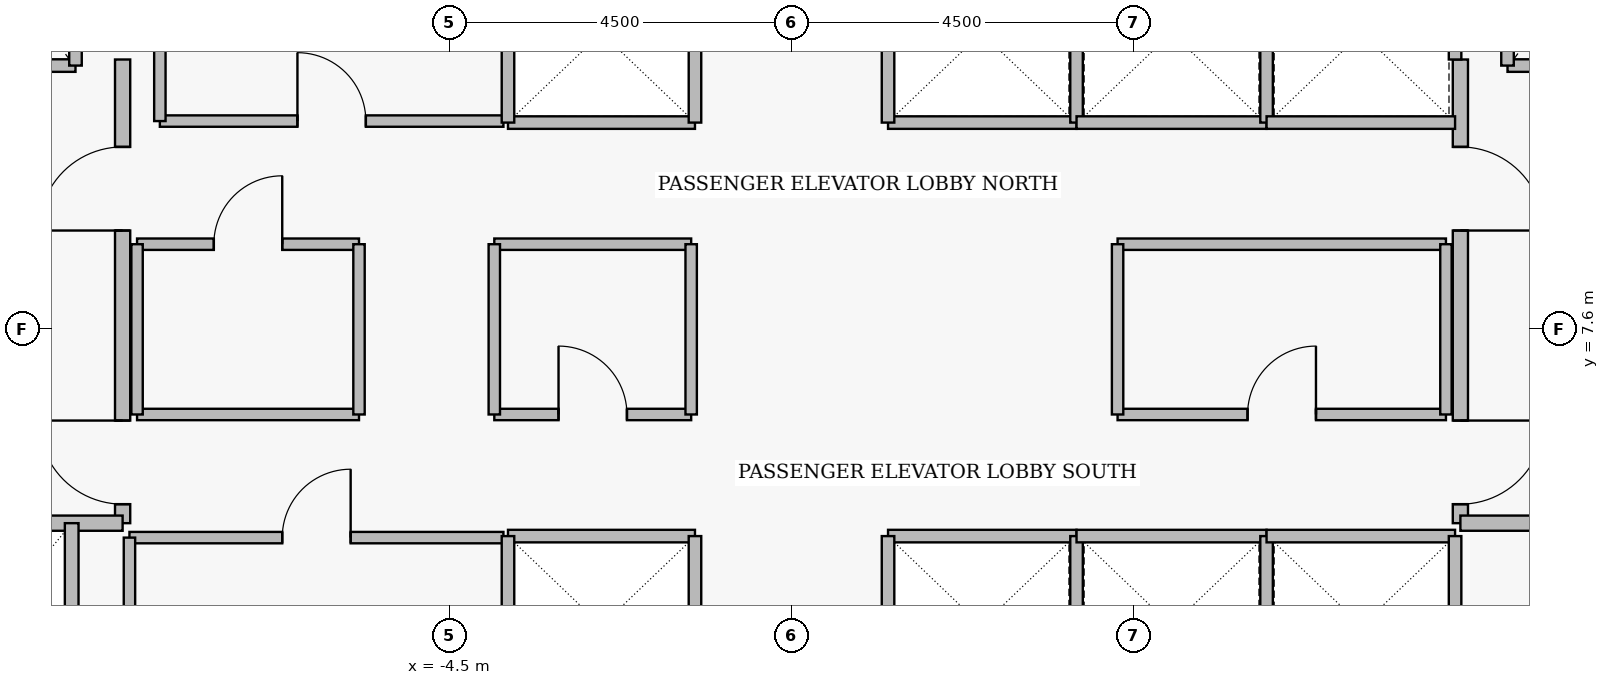
"""IFC4 building model, lengths in metres.
Left out: names, types, materials, properties, quantities, classifications, styles, units other than length and angle.
Written with IfcOpenShell. Run it as: python <this file> out.ifc"""

import sys

from ifc_helpers import new_model, si_unit, direction, frame, frame_2d, origin, place, context, subcontext, project, spatial, rectangle, extrude, element, fill, save


model = new_model("IFC4")
c1 = context("Model", 3, precision=1e-05, world=origin(), true_north=direction((0.0, 1.0)))
c2 = subcontext(c1, "Body", "Model", "MODEL_VIEW")
j1 = project(units=[si_unit("LENGTHUNIT", "METRE"), si_unit("PLANEANGLEUNIT", "RADIAN")], contexts=[c1])
p1 = place(None, origin())
s1 = spatial("IfcSite", under=j1, at=p1, CompositionType="ELEMENT")
p2 = place(p1, origin())
s2 = spatial("IfcBuilding", under=s1, at=p2, CompositionType="ELEMENT")
p3 = place(p2, frame((0.0, 0.0, 162.2)))
s3 = spatial("IfcBuildingStorey", under=s2, at=p3, CompositionType="ELEMENT", Elevation=162.2)
p4 = place(p3, frame((-8.8, 5.05, 0.0), z_axis=(0.0, 0.0, 1.0), x_axis=(0.0, 1.0, 0.0)))
e1 = element("IfcWall", 1, at=p4, inside=s3, PredefinedType="PARTITIONING", context=c2, shape_type="SweptSolid", body=[
    extrude(rectangle(XDim=6.1, YDim=0.2, at=frame_2d((3.05, 0.0))), origin(), (0.0, 0.0, 1.0), 5.74),
])
p5 = place(p4, frame((0.25, 0.0, 0.0)))
e2 = element("IfcOpeningElement", 2, at=p5, cuts=e1, PredefinedType="OPENING", context=c2, shape_type="SweptSolid", body=[
    extrude(rectangle(XDim=1.1, YDim=2.2, at=frame_2d((0.55, 1.1))), frame((0.0, 0.11, 0.0), z_axis=(0.0, -1.0, 0.0), x_axis=(1.0, 0.0, 0.0)), (0.0, 0.0, 1.0), 0.22),
])
p6 = place(p4, frame((3.85, 0.0, 0.0)))
e3 = element("IfcOpeningElement", 3, at=p6, cuts=e1, PredefinedType="OPENING", context=c2, shape_type="SweptSolid", body=[
    extrude(rectangle(XDim=1.1, YDim=2.2, at=frame_2d((0.55, 1.1))), frame((0.0, 0.11, 0.0), z_axis=(0.0, -1.0, 0.0), x_axis=(1.0, 0.0, 0.0)), (0.0, 0.0, 1.0), 0.22),
])
p7 = place(p3, frame((8.8, 11.15, 0.0), z_axis=(0.0, 0.0, 1.0), x_axis=(0.0, -1.0, 0.0)))
e4 = element("IfcWall", 4, at=p7, inside=s3, PredefinedType="PARTITIONING", context=c2, shape_type="SweptSolid", body=[
    extrude(rectangle(XDim=6.1, YDim=0.2, at=frame_2d((3.05, 0.0))), origin(), (0.0, 0.0, 1.0), 5.74),
])
p8 = place(p7, frame((1.15, 0.0, 0.0)))
e5 = element("IfcOpeningElement", 5, at=p8, cuts=e4, PredefinedType="OPENING", context=c2, shape_type="SweptSolid", body=[
    extrude(rectangle(XDim=1.1, YDim=2.2, at=frame_2d((0.55, 1.1))), frame((0.0, 0.11, 0.0), z_axis=(0.0, -1.0, 0.0), x_axis=(1.0, 0.0, 0.0)), (0.0, 0.0, 1.0), 0.22),
])
p9 = place(p7, frame((4.75, 0.0, 0.0)))
e6 = element("IfcOpeningElement", 6, at=p9, cuts=e4, PredefinedType="OPENING", context=c2, shape_type="SweptSolid", body=[
    extrude(rectangle(XDim=1.1, YDim=2.2, at=frame_2d((0.55, 1.1))), frame((0.0, 0.11, 0.0), z_axis=(0.0, -1.0, 0.0), x_axis=(1.0, 0.0, 0.0)), (0.0, 0.0, 1.0), 0.22),
])
p10 = place(p3, frame((-11.58, 11.07, 0.0), z_axis=(0.0, 0.0, 1.0), x_axis=(1.0, 0.0, 0.0)))
e7 = element("IfcWall", 7, at=p10, inside=s3, PredefinedType="PARTITIONING", context=c2, shape_type="SweptSolid", body=[
    extrude(rectangle(XDim=2.16, YDim=0.165, at=frame_2d((1.08, 0.0))), origin(), (0.0, 0.0, 1.0), 5.74),
])
p11 = place(p10, frame((0.53, 0.0, 0.0)))
e8 = element("IfcOpeningElement", 8, at=p11, cuts=e7, PredefinedType="OPENING", context=c2, shape_type="SweptSolid", body=[
    extrude(rectangle(XDim=1.15, YDim=2.25, at=frame_2d((0.575, 1.125))), frame((0.0, 0.093, 0.0), z_axis=(0.0, -1.0, 0.0), x_axis=(1.0, 0.0, 0.0)), (0.0, 0.0, 1.0), 0.185),
])
p12 = place(p3, frame((9.42, 11.07, 0.0), z_axis=(0.0, 0.0, 1.0), x_axis=(1.0, 0.0, 0.0)))
e9 = element("IfcWall", 9, at=p12, inside=s3, PredefinedType="PARTITIONING", context=c2, shape_type="SweptSolid", body=[
    extrude(rectangle(XDim=2.16, YDim=0.165, at=frame_2d((1.08, 0.0))), origin(), (0.0, 0.0, 1.0), 5.74),
])
p13 = place(p12, frame((0.53, 0.0, 0.0)))
e10 = element("IfcOpeningElement", 10, at=p13, cuts=e9, PredefinedType="OPENING", context=c2, shape_type="SweptSolid", body=[
    extrude(rectangle(XDim=1.15, YDim=2.25, at=frame_2d((0.575, 1.125))), frame((0.0, 0.093, 0.0), z_axis=(0.0, -1.0, 0.0), x_axis=(1.0, 0.0, 0.0)), (0.0, 0.0, 1.0), 0.185),
])
p14 = place(p3, frame((-8.71, 4.86, 0.0), z_axis=(0.0, 0.0, 1.0), x_axis=(1.0, 0.0, 0.0)))
e11 = element("IfcWall", 11, at=p14, inside=s3, PredefinedType="PARTITIONING", context=c2, shape_type="SweptSolid", body=[
    extrude(rectangle(XDim=4.92, YDim=0.15, at=frame_2d((2.46, 0.0))), origin(), (0.0, 0.0, 1.0), 5.74),
])
p15 = place(p14, frame((2.01, 0.0, 0.0)))
e12 = element("IfcOpeningElement", 12, at=p15, cuts=e11, PredefinedType="OPENING", context=c2, shape_type="SweptSolid", body=[
    extrude(rectangle(XDim=0.9, YDim=2.15, at=frame_2d((0.45, 1.075))), frame((0.0, 0.085, 0.0), z_axis=(0.0, -1.0, 0.0), x_axis=(1.0, 0.0, 0.0)), (0.0, 0.0, 1.0), 0.17),
])
p16 = place(p3, frame((-8.31, 10.34, 0.0), z_axis=(0.0, 0.0, 1.0), x_axis=(1.0, 0.0, 0.0)))
e13 = element("IfcWall", 13, at=p16, inside=s3, PredefinedType="PARTITIONING", context=c2, shape_type="SweptSolid", body=[
    extrude(rectangle(XDim=4.52, YDim=0.15, at=frame_2d((2.26, 0.0))), origin(), (0.0, 0.0, 1.0), 5.74),
])
p17 = place(p16, frame((1.81, 0.0, 0.0)))
e14 = element("IfcOpeningElement", 14, at=p17, cuts=e13, PredefinedType="OPENING", context=c2, shape_type="SweptSolid", body=[
    extrude(rectangle(XDim=0.9, YDim=2.15, at=frame_2d((0.45, 1.075))), frame((0.0, 0.085, 0.0), z_axis=(0.0, -1.0, 0.0), x_axis=(1.0, 0.0, 0.0)), (0.0, 0.0, 1.0), 0.17),
])
p18 = place(p3, frame((-8.61, 8.72, 0.0), z_axis=(0.0, 0.0, 1.0), x_axis=(1.0, 0.0, 0.0)))
e15 = element("IfcWall", 15, at=p18, inside=s3, PredefinedType="PARTITIONING", context=c2, shape_type="SweptSolid", body=[
    extrude(rectangle(XDim=2.92, YDim=0.15, at=frame_2d((1.46, 0.0))), origin(), (0.0, 0.0, 1.0), 5.74),
])
p19 = place(p18, frame((1.01, 0.0, 0.0)))
e16 = element("IfcOpeningElement", 16, at=p19, cuts=e15, PredefinedType="OPENING", context=c2, shape_type="SweptSolid", body=[
    extrude(rectangle(XDim=0.9, YDim=2.15, at=frame_2d((0.45, 1.075))), frame((0.0, 0.085, 0.0), z_axis=(0.0, -1.0, 0.0), x_axis=(1.0, 0.0, 0.0)), (0.0, 0.0, 1.0), 0.17),
])
p20 = place(p3, frame((-3.91, 6.48, 0.0), z_axis=(0.0, 0.0, 1.0), x_axis=(1.0, 0.0, 0.0)))
e17 = element("IfcWall", 17, at=p20, inside=s3, PredefinedType="PARTITIONING", context=c2, shape_type="SweptSolid", body=[
    extrude(rectangle(XDim=2.59, YDim=0.15, at=frame_2d((1.295, 0.0))), origin(), (0.0, 0.0, 1.0), 5.74),
])
p21 = place(p20, frame((0.845, 0.0, 0.0)))
e18 = element("IfcOpeningElement", 18, at=p21, cuts=e17, PredefinedType="OPENING", context=c2, shape_type="SweptSolid", body=[
    extrude(rectangle(XDim=0.9, YDim=2.15, at=frame_2d((0.45, 1.075))), frame((0.0, 0.085, 0.0), z_axis=(0.0, -1.0, 0.0), x_axis=(1.0, 0.0, 0.0)), (0.0, 0.0, 1.0), 0.17),
])
p22 = place(p3, frame((4.29, 6.48, 0.0), z_axis=(0.0, 0.0, 1.0), x_axis=(1.0, 0.0, 0.0)))
e19 = element("IfcWall", 19, at=p22, inside=s3, PredefinedType="PARTITIONING", context=c2, shape_type="SweptSolid", body=[
    extrude(rectangle(XDim=4.32, YDim=0.15, at=frame_2d((2.16, 0.0))), origin(), (0.0, 0.0, 1.0), 5.74),
])
p23 = place(p22, frame((1.71, 0.0, 0.0)))
e20 = element("IfcOpeningElement", 20, at=p23, cuts=e19, PredefinedType="OPENING", context=c2, shape_type="SweptSolid", body=[
    extrude(rectangle(XDim=0.9, YDim=2.15, at=frame_2d((0.45, 1.075))), frame((0.0, 0.085, 0.0), z_axis=(0.0, -1.0, 0.0), x_axis=(1.0, 0.0, 0.0)), (0.0, 0.0, 1.0), 0.17),
])
for number, where, z_axis, x_axis in (
    (21, (-11.65, 5.05, 0.0), (0.0, 0.0, 1.0), (1.0, 0.0, 0.0)),
    (22, (8.8, 5.05, 0.0), (0.0, 0.0, 1.0), (1.0, 0.0, 0.0)),
):
    element("IfcWall", number, at=place(p3, frame(where, z_axis=z_axis, x_axis=x_axis)), inside=s3, PredefinedType="PARTITIONING", context=c2, shape_type="SweptSolid", body=[
        extrude(rectangle(XDim=2.85, YDim=0.2, at=frame_2d((1.425, 0.0))), origin(), (0.0, 0.0, 1.0), 5.74),
    ])
for number, where, z_axis, x_axis in (
    (23, (-9.42, 11.07, 0.0), (0.0, 0.0, 1.0), (0.0, 1.0, 0.0)),
    (24, (9.42, 11.07, 0.0), (0.0, 0.0, 1.0), (0.0, 1.0, 0.0)),
):
    element("IfcWall", number, at=place(p3, frame(where, z_axis=z_axis, x_axis=x_axis)), inside=s3, PredefinedType="PARTITIONING", context=c2, shape_type="SweptSolid", body=[
        extrude(rectangle(XDim=2.96, YDim=0.165, at=frame_2d((1.48, 0.0))), origin(), (0.0, 0.0, 1.0), 5.74),
    ])
p24 = place(p3, frame((-3.73, 4.88, 0.0), z_axis=(0.0, 0.0, 1.0), x_axis=(1.0, 0.0, 0.0)))
e25 = element("IfcWall", 25, at=p24, inside=s3, PredefinedType="PARTITIONING", context=c2, shape_type="SweptSolid", body=[
    extrude(rectangle(XDim=2.46, YDim=0.165, at=frame_2d((1.23, 0.0))), origin(), (0.0, 0.0, 1.0), 5.74),
])
for number, where, z_axis, x_axis in (
    (26, (-3.73, 2.52, 0.0), (0.0, 0.0, 1.0), (0.0, 1.0, 0.0)),
    (27, (-1.27, 2.52, 0.0), (0.0, 0.0, 1.0), (0.0, 1.0, 0.0)),
):
    element("IfcWall", number, at=place(p3, frame(where, z_axis=z_axis, x_axis=x_axis)), inside=s3, PredefinedType="PARTITIONING", context=c2, shape_type="SweptSolid", body=[
        extrude(rectangle(XDim=2.36, YDim=0.165, at=frame_2d((1.18, 0.0))), origin(), (0.0, 0.0, 1.0), 5.74),
    ])
p25 = place(p3, frame((1.27, 4.88, 0.0), z_axis=(0.0, 0.0, 1.0), x_axis=(1.0, 0.0, 0.0)))
e28 = element("IfcWall", 28, at=p25, inside=s3, PredefinedType="PARTITIONING", context=c2, shape_type="SweptSolid", body=[
    extrude(rectangle(XDim=2.48, YDim=0.165, at=frame_2d((1.24, 0.0))), origin(), (0.0, 0.0, 1.0), 5.74),
])
for number, where, z_axis, x_axis in (
    (29, (1.27, 2.52, 0.0), (0.0, 0.0, 1.0), (0.0, 1.0, 0.0)),
    (30, (3.75, 2.52, 0.0), (0.0, 0.0, 1.0), (0.0, 1.0, 0.0)),
):
    element("IfcWall", number, at=place(p3, frame(where, z_axis=z_axis, x_axis=x_axis)), inside=s3, PredefinedType="PARTITIONING", context=c2, shape_type="SweptSolid", body=[
        extrude(rectangle(XDim=2.36, YDim=0.165, at=frame_2d((1.18, 0.0))), origin(), (0.0, 0.0, 1.0), 5.74),
    ])
p26 = place(p3, frame((-3.73, 10.32, 0.0), z_axis=(0.0, 0.0, 1.0), x_axis=(1.0, 0.0, 0.0)))
e31 = element("IfcWall", 31, at=p26, inside=s3, PredefinedType="PARTITIONING", context=c2, shape_type="SweptSolid", body=[
    extrude(rectangle(XDim=2.46, YDim=0.165, at=frame_2d((1.23, 0.0))), origin(), (0.0, 0.0, 1.0), 5.74),
])
for number, where, z_axis, x_axis in (
    (32, (-3.73, 10.32, 0.0), (0.0, 0.0, 1.0), (0.0, 1.0, 0.0)),
    (33, (-1.27, 10.32, 0.0), (0.0, 0.0, 1.0), (0.0, 1.0, 0.0)),
):
    element("IfcWall", number, at=place(p3, frame(where, z_axis=z_axis, x_axis=x_axis)), inside=s3, PredefinedType="PARTITIONING", context=c2, shape_type="SweptSolid", body=[
        extrude(rectangle(XDim=2.36, YDim=0.165, at=frame_2d((1.18, 0.0))), origin(), (0.0, 0.0, 1.0), 5.74),
    ])
p27 = place(p3, frame((1.27, 10.32, 0.0), z_axis=(0.0, 0.0, 1.0), x_axis=(1.0, 0.0, 0.0)))
e34 = element("IfcWall", 34, at=p27, inside=s3, PredefinedType="PARTITIONING", context=c2, shape_type="SweptSolid", body=[
    extrude(rectangle(XDim=2.48, YDim=0.165, at=frame_2d((1.24, 0.0))), origin(), (0.0, 0.0, 1.0), 5.74),
])
for number, where, z_axis, x_axis in (
    (35, (1.27, 10.32, 0.0), (0.0, 0.0, 1.0), (0.0, 1.0, 0.0)),
    (36, (3.75, 10.32, 0.0), (0.0, 0.0, 1.0), (0.0, 1.0, 0.0)),
):
    element("IfcWall", number, at=place(p3, frame(where, z_axis=z_axis, x_axis=x_axis)), inside=s3, PredefinedType="PARTITIONING", context=c2, shape_type="SweptSolid", body=[
        extrude(rectangle(XDim=2.36, YDim=0.165, at=frame_2d((1.18, 0.0))), origin(), (0.0, 0.0, 1.0), 5.74),
    ])
p28 = place(p3, frame((3.75, 4.88, 0.0), z_axis=(0.0, 0.0, 1.0), x_axis=(1.0, 0.0, 0.0)))
e37 = element("IfcWall", 37, at=p28, inside=s3, PredefinedType="PARTITIONING", context=c2, shape_type="SweptSolid", body=[
    extrude(rectangle(XDim=2.5, YDim=0.165, at=frame_2d((1.25, 0.0))), origin(), (0.0, 0.0, 1.0), 5.74),
])
p29 = place(p3, frame((6.25, 2.52, 0.0), z_axis=(0.0, 0.0, 1.0), x_axis=(0.0, 1.0, 0.0)))
e38 = element("IfcWall", 38, at=p29, inside=s3, PredefinedType="PARTITIONING", context=c2, shape_type="SweptSolid", body=[
    extrude(rectangle(XDim=2.36, YDim=0.165, at=frame_2d((1.18, 0.0))), origin(), (0.0, 0.0, 1.0), 5.74),
])
p30 = place(p3, frame((6.25, 4.88, 0.0), z_axis=(0.0, 0.0, 1.0), x_axis=(1.0, 0.0, 0.0)))
e39 = element("IfcWall", 39, at=p30, inside=s3, PredefinedType="PARTITIONING", context=c2, shape_type="SweptSolid", body=[
    extrude(rectangle(XDim=2.48, YDim=0.165, at=frame_2d((1.24, 0.0))), origin(), (0.0, 0.0, 1.0), 5.74),
])
p31 = place(p3, frame((8.73, 2.52, 0.0), z_axis=(0.0, 0.0, 1.0), x_axis=(0.0, 1.0, 0.0)))
e40 = element("IfcWall", 40, at=p31, inside=s3, PredefinedType="PARTITIONING", context=c2, shape_type="SweptSolid", body=[
    extrude(rectangle(XDim=2.36, YDim=0.165, at=frame_2d((1.18, 0.0))), origin(), (0.0, 0.0, 1.0), 5.74),
])
p32 = place(p3, frame((3.75, 10.32, 0.0), z_axis=(0.0, 0.0, 1.0), x_axis=(1.0, 0.0, 0.0)))
e41 = element("IfcWall", 41, at=p32, inside=s3, PredefinedType="PARTITIONING", context=c2, shape_type="SweptSolid", body=[
    extrude(rectangle(XDim=2.5, YDim=0.165, at=frame_2d((1.25, 0.0))), origin(), (0.0, 0.0, 1.0), 5.74),
])
p33 = place(p3, frame((6.25, 10.32, 0.0), z_axis=(0.0, 0.0, 1.0), x_axis=(0.0, 1.0, 0.0)))
e42 = element("IfcWall", 42, at=p33, inside=s3, PredefinedType="PARTITIONING", context=c2, shape_type="SweptSolid", body=[
    extrude(rectangle(XDim=2.36, YDim=0.165, at=frame_2d((1.18, 0.0))), origin(), (0.0, 0.0, 1.0), 5.74),
])
p34 = place(p3, frame((6.25, 10.32, 0.0), z_axis=(0.0, 0.0, 1.0), x_axis=(1.0, 0.0, 0.0)))
e43 = element("IfcWall", 43, at=p34, inside=s3, PredefinedType="PARTITIONING", context=c2, shape_type="SweptSolid", body=[
    extrude(rectangle(XDim=2.48, YDim=0.165, at=frame_2d((1.24, 0.0))), origin(), (0.0, 0.0, 1.0), 5.74),
])
p35 = place(p3, frame((8.73, 11.15, 0.0), z_axis=(0.0, 0.0, 1.0), x_axis=(0.0, 1.0, 0.0)))
e44 = element("IfcWall", 44, at=p35, inside=s3, PredefinedType="PARTITIONING", context=c2, shape_type="SweptSolid", body=[
    extrude(rectangle(XDim=1.53, YDim=0.165, at=frame_2d((0.765, 0.0))), origin(), (0.0, 0.0, 1.0), 5.74),
])
p36 = place(p3, frame((-8.71, 2.49, 0.0), z_axis=(0.0, 0.0, 1.0), x_axis=(0.0, 1.0, 0.0)))
e45 = element("IfcWall", 45, at=p36, inside=s3, PredefinedType="PARTITIONING", context=c2, shape_type="SweptSolid", body=[
    extrude(rectangle(XDim=2.37, YDim=0.15, at=frame_2d((1.185, 0.0))), origin(), (0.0, 0.0, 1.0), 5.74),
])
p37 = place(p3, frame((-8.31, 10.34, 0.0), z_axis=(0.0, 0.0, 1.0), x_axis=(0.0, 1.0, 0.0)))
e46 = element("IfcWall", 46, at=p37, inside=s3, PredefinedType="PARTITIONING", context=c2, shape_type="SweptSolid", body=[
    extrude(rectangle(XDim=2.52, YDim=0.15, at=frame_2d((1.26, 0.0))), origin(), (0.0, 0.0, 1.0), 5.74),
])
p38 = place(p3, frame((-9.47, 2.45, 0.0), z_axis=(0.0, 0.0, 1.0), x_axis=(0.0, 1.0, 0.0)))
e47 = element("IfcWall", 47, at=p38, inside=s3, PredefinedType="PARTITIONING", context=c2, shape_type="SweptSolid", body=[
    extrude(rectangle(XDim=2.6, YDim=0.18, at=frame_2d((1.3, 0.0))), origin(), (0.0, 0.0, 1.0), 5.74),
])
p39 = place(p3, frame((-8.61, 6.48, 0.0), z_axis=(0.0, 0.0, 1.0), x_axis=(1.0, 0.0, 0.0)))
e48 = element("IfcWall", 48, at=p39, inside=s3, PredefinedType="PARTITIONING", context=c2, shape_type="SweptSolid", body=[
    extrude(rectangle(XDim=2.92, YDim=0.15, at=frame_2d((1.46, 0.0))), origin(), (0.0, 0.0, 1.0), 5.74),
])
for number, where, z_axis, x_axis in (
    (49, (-8.61, 6.48, 0.0), (0.0, 0.0, 1.0), (0.0, 1.0, 0.0)),
    (50, (-5.69, 6.48, 0.0), (0.0, 0.0, 1.0), (0.0, 1.0, 0.0)),
):
    element("IfcWall", number, at=place(p3, frame(where, z_axis=z_axis, x_axis=x_axis)), inside=s3, PredefinedType="PARTITIONING", context=c2, shape_type="SweptSolid", body=[
        extrude(rectangle(XDim=2.24, YDim=0.15, at=frame_2d((1.12, 0.0))), origin(), (0.0, 0.0, 1.0), 5.74),
    ])
p40 = place(p3, frame((-3.91, 8.72, 0.0), z_axis=(0.0, 0.0, 1.0), x_axis=(1.0, 0.0, 0.0)))
e51 = element("IfcWall", 51, at=p40, inside=s3, PredefinedType="PARTITIONING", context=c2, shape_type="SweptSolid", body=[
    extrude(rectangle(XDim=2.59, YDim=0.15, at=frame_2d((1.295, 0.0))), origin(), (0.0, 0.0, 1.0), 5.74),
])
for number, where, z_axis, x_axis in (
    (52, (-3.91, 6.48, 0.0), (0.0, 0.0, 1.0), (0.0, 1.0, 0.0)),
    (53, (-1.32, 6.48, 0.0), (0.0, 0.0, 1.0), (0.0, 1.0, 0.0)),
):
    element("IfcWall", number, at=place(p3, frame(where, z_axis=z_axis, x_axis=x_axis)), inside=s3, PredefinedType="PARTITIONING", context=c2, shape_type="SweptSolid", body=[
        extrude(rectangle(XDim=2.24, YDim=0.15, at=frame_2d((1.12, 0.0))), origin(), (0.0, 0.0, 1.0), 5.74),
    ])
p41 = place(p3, frame((4.29, 8.72, 0.0), z_axis=(0.0, 0.0, 1.0), x_axis=(1.0, 0.0, 0.0)))
e54 = element("IfcWall", 54, at=p41, inside=s3, PredefinedType="PARTITIONING", context=c2, shape_type="SweptSolid", body=[
    extrude(rectangle(XDim=4.32, YDim=0.15, at=frame_2d((2.16, 0.0))), origin(), (0.0, 0.0, 1.0), 5.74),
])
for number, where, z_axis, x_axis in (
    (55, (4.29, 6.48, 0.0), (0.0, 0.0, 1.0), (0.0, 1.0, 0.0)),
    (56, (8.61, 6.48, 0.0), (0.0, 0.0, 1.0), (0.0, 1.0, 0.0)),
):
    element("IfcWall", number, at=place(p3, frame(where, z_axis=z_axis, x_axis=x_axis)), inside=s3, PredefinedType="PARTITIONING", context=c2, shape_type="SweptSolid", body=[
        extrude(rectangle(XDim=2.24, YDim=0.15, at=frame_2d((1.12, 0.0))), origin(), (0.0, 0.0, 1.0), 5.74),
    ])
p42 = place(p5, origin())
e57 = element("IfcDoor", 57, at=p42, inside=s3, OperationType="SINGLE_SWING_RIGHT", PredefinedType="DOOR", context=c2, shape_type="SweptSolid", body=[
    extrude(rectangle(XDim=1.1, YDim=2.2, at=frame_2d((0.55, 1.1))), frame((0.0, 0.025, 0.0), z_axis=(0.0, -1.0, 0.0), x_axis=(1.0, 0.0, 0.0)), (0.0, 0.0, 1.0), 0.05),
])
fill(e2, e57)
p43 = place(p6, origin())
e58 = element("IfcDoor", 58, at=p43, inside=s3, OperationType="SINGLE_SWING_LEFT", PredefinedType="DOOR", context=c2, shape_type="SweptSolid", body=[
    extrude(rectangle(XDim=1.1, YDim=2.2, at=frame_2d((0.55, 1.1))), frame((0.0, 0.025, 0.0), z_axis=(0.0, -1.0, 0.0), x_axis=(1.0, 0.0, 0.0)), (0.0, 0.0, 1.0), 0.05),
])
fill(e3, e58)
p44 = place(p8, origin())
e59 = element("IfcDoor", 59, at=p44, inside=s3, OperationType="SINGLE_SWING_RIGHT", PredefinedType="DOOR", context=c2, shape_type="SweptSolid", body=[
    extrude(rectangle(XDim=1.1, YDim=2.2, at=frame_2d((0.55, 1.1))), frame((0.0, 0.025, 0.0), z_axis=(0.0, -1.0, 0.0), x_axis=(1.0, 0.0, 0.0)), (0.0, 0.0, 1.0), 0.05),
])
fill(e5, e59)
p45 = place(p9, origin())
e60 = element("IfcDoor", 60, at=p45, inside=s3, OperationType="SINGLE_SWING_LEFT", PredefinedType="DOOR", context=c2, shape_type="SweptSolid", body=[
    extrude(rectangle(XDim=1.1, YDim=2.2, at=frame_2d((0.55, 1.1))), frame((0.0, 0.025, 0.0), z_axis=(0.0, -1.0, 0.0), x_axis=(1.0, 0.0, 0.0)), (0.0, 0.0, 1.0), 0.05),
])
fill(e6, e60)
p46 = place(p15, origin())
e61 = element("IfcDoor", 61, at=p46, inside=s3, OperationType="SINGLE_SWING_RIGHT", PredefinedType="DOOR", context=c2, shape_type="SweptSolid", body=[
    extrude(rectangle(XDim=0.9, YDim=2.15, at=frame_2d((0.45, 1.075))), frame((0.0, 0.025, 0.0), z_axis=(0.0, -1.0, 0.0), x_axis=(1.0, 0.0, 0.0)), (0.0, 0.0, 1.0), 0.05),
])
fill(e12, e61)
p47 = place(p17, origin())
e62 = element("IfcDoor", 62, at=p47, inside=s3, OperationType="SINGLE_SWING_LEFT", PredefinedType="DOOR", context=c2, shape_type="SweptSolid", body=[
    extrude(rectangle(XDim=0.9, YDim=2.15, at=frame_2d((0.45, 1.075))), frame((0.0, 0.025, 0.0), z_axis=(0.0, -1.0, 0.0), x_axis=(1.0, 0.0, 0.0)), (0.0, 0.0, 1.0), 0.05),
])
fill(e14, e62)
p48 = place(p19, origin())
e63 = element("IfcDoor", 63, at=p48, inside=s3, OperationType="SINGLE_SWING_RIGHT", PredefinedType="DOOR", context=c2, shape_type="SweptSolid", body=[
    extrude(rectangle(XDim=0.9, YDim=2.15, at=frame_2d((0.45, 1.075))), frame((0.0, 0.025, 0.0), z_axis=(0.0, -1.0, 0.0), x_axis=(1.0, 0.0, 0.0)), (0.0, 0.0, 1.0), 0.05),
])
fill(e16, e63)
p49 = place(p21, origin())
e64 = element("IfcDoor", 64, at=p49, inside=s3, OperationType="SINGLE_SWING_LEFT", PredefinedType="DOOR", context=c2, shape_type="SweptSolid", body=[
    extrude(rectangle(XDim=0.9, YDim=2.15, at=frame_2d((0.45, 1.075))), frame((0.0, 0.025, 0.0), z_axis=(0.0, -1.0, 0.0), x_axis=(1.0, 0.0, 0.0)), (0.0, 0.0, 1.0), 0.05),
])
fill(e18, e64)
p50 = place(p23, origin())
e65 = element("IfcDoor", 65, at=p50, inside=s3, OperationType="SINGLE_SWING_RIGHT", PredefinedType="DOOR", context=c2, shape_type="SweptSolid", body=[
    extrude(rectangle(XDim=0.9, YDim=2.15, at=frame_2d((0.45, 1.075))), frame((0.0, 0.025, 0.0), z_axis=(0.0, -1.0, 0.0), x_axis=(1.0, 0.0, 0.0)), (0.0, 0.0, 1.0), 0.05),
])
fill(e20, e65)
save(model, sys.argv[1])
